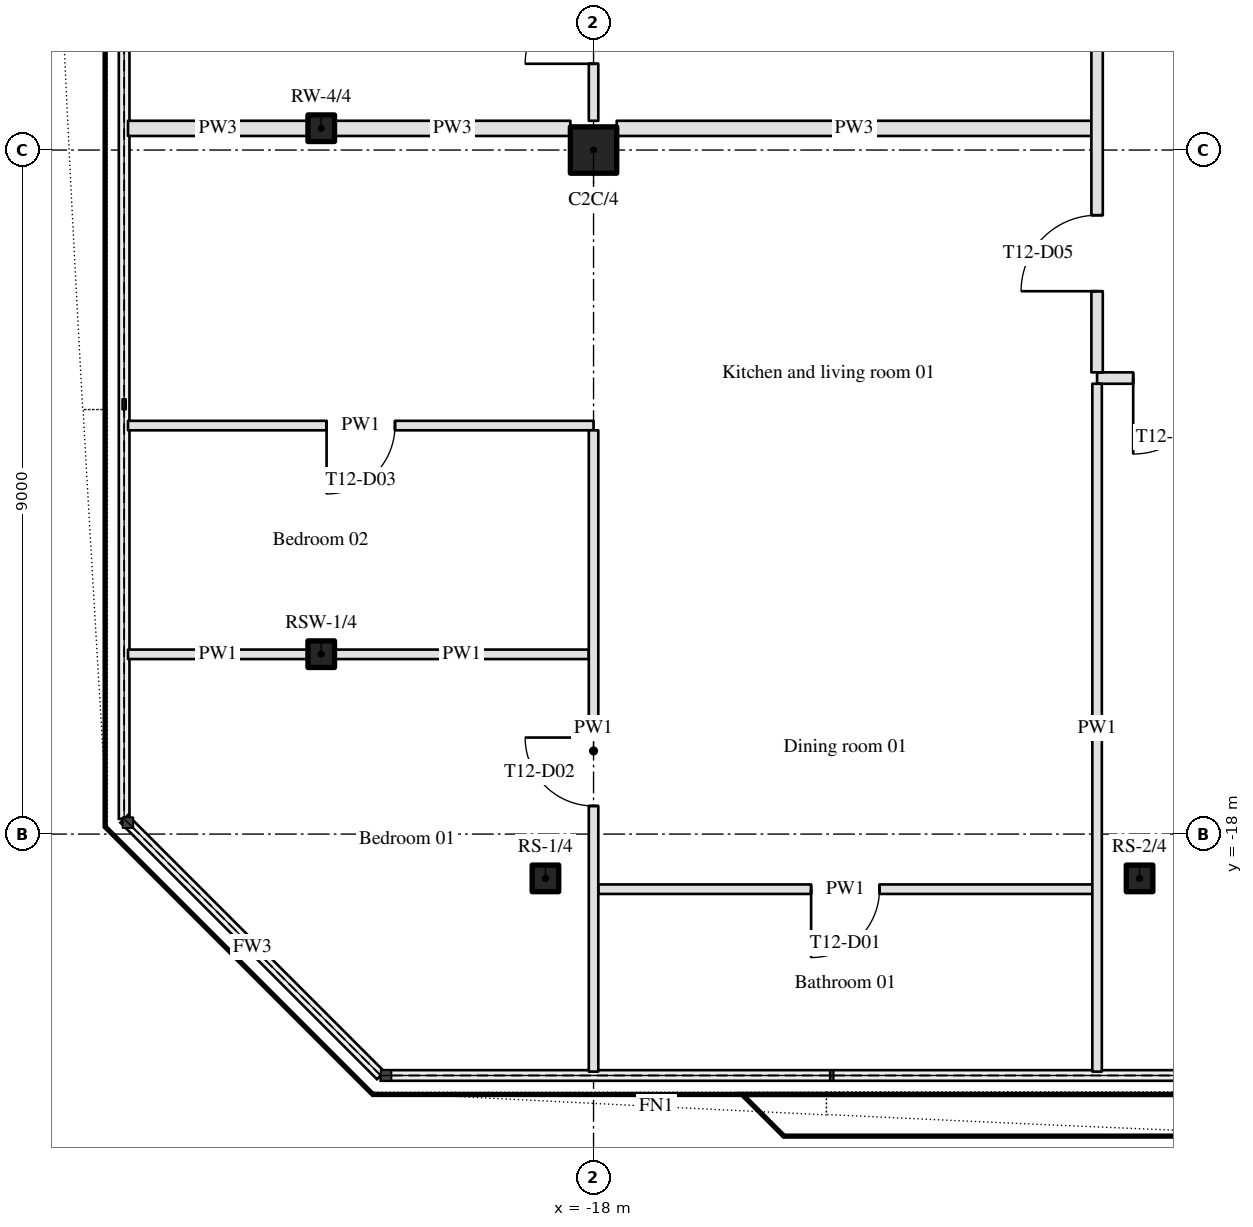
"""IFC4 building model, lengths in metres.
Left out: names, types, materials, properties, quantities, classifications, styles, units other than length and angle.
Written with IfcOpenShell. Run it as: python <this file> out.ifc"""

import sys

from ifc_helpers import new_model, si_unit, direction, frame, frame_2d, origin, origin_2d, place, context, subcontext, project, spatial, rectangle, hollow_rectangle, hollow_circle, extrude, element, fill, save


model = new_model("IFC4")
c1 = context("Model", 3, precision=1e-05, world=origin(), true_north=direction((0.0, 1.0)))
c2 = subcontext(c1, "Body", "Model", "MODEL_VIEW")
j1 = project(units=[si_unit("LENGTHUNIT", "METRE"), si_unit("PLANEANGLEUNIT", "RADIAN")], contexts=[c1])
p1 = place(None, origin())
s1 = spatial("IfcSite", under=j1, at=p1, CompositionType="ELEMENT")
p2 = place(p1, origin())
s2 = spatial("IfcBuilding", under=s1, at=p2, CompositionType="ELEMENT")
p3 = place(p2, frame((0.0, 0.0, 172.2)))
s3 = spatial("IfcBuildingStorey", under=s2, at=p3, CompositionType="ELEMENT", Elevation=172.2)
p4 = place(p3, frame((-18.0, -9.0, 0.0), z_axis=(0.0, 0.0, 1.0), x_axis=(1.0, 0.0, 0.0)))
e1 = element("IfcColumn", 1, at=p4, inside=s3, PredefinedType="COLUMN", context=c2, shape_type="SweptSolid", body=[
    extrude(hollow_circle(Radius=0.305, WallThickness=0.03, at=origin_2d()), origin(), (0.0, 0.0, 1.0), 3.15),
])
for number, where, z_axis, x_axis in (
    (2, (-18.633, -18.583, 0.0), (0.0, 0.0, 1.0), (1.0, 0.0, 0.0)),
    (3, (-10.816, -18.583, 0.0), (0.0, 0.0, 1.0), (1.0, 0.0, 0.0)),
    (4, (-21.583, -8.713, 0.0), (0.0, 0.0, 1.0), (1.0, 0.0, 0.0)),
    (5, (-21.583, -15.633, 0.0), (0.0, 0.0, 1.0), (1.0, 0.0, 0.0)),
):
    element("IfcColumn", number, at=place(p3, frame(where, z_axis=z_axis, x_axis=x_axis)), inside=s3, PredefinedType="COLUMN", context=c2, shape_type="SweptSolid", body=[
        extrude(hollow_rectangle(XDim=0.35, YDim=0.35, WallThickness=0.02, InnerFilletRadius=0.03, OuterFilletRadius=0.05, at=origin_2d()), origin(), (0.0, 0.0, 1.0), 3.15),
    ])
p5 = place(p3, frame((-11.438, -18.725, 0.0), z_axis=(0.0, 0.0, 1.0), x_axis=(-1.0, 0.0, 0.0)))
e6 = element("IfcWall", 6, at=p5, inside=s3, PredefinedType="PARTITIONING", context=c2, shape_type="SweptSolid", body=[
    extrude(rectangle(XDim=6.5, YDim=0.125, at=frame_2d((3.25, 0.0))), origin(), (0.0, 0.0, 1.0), 2.21),
])
p6 = place(p5, frame((2.8, 0.0, 0.0)))
e7 = element("IfcOpeningElement", 7, at=p6, cuts=e6, PredefinedType="OPENING", context=c2, shape_type="SweptSolid", body=[
    extrude(rectangle(XDim=0.9, YDim=2.1, at=frame_2d((0.45, 1.05))), frame((0.0, 0.073, 0.0), z_axis=(0.0, -1.0, 0.0), x_axis=(1.0, 0.0, 0.0)), (0.0, 0.0, 1.0), 0.145),
])
p7 = place(p3, frame((-24.125, -15.635, 0.0), z_axis=(0.0, 0.0, 1.0), x_axis=(1.0, 0.0, 0.0)))
e8 = element("IfcWall", 8, at=p7, inside=s3, PredefinedType="PARTITIONING", context=c2, shape_type="SweptSolid", body=[
    extrude(rectangle(XDim=2.367, YDim=0.125, at=frame_2d((1.184, 0.0))), origin(), (0.0, 0.0, 1.0), 2.21),
])
p8 = place(p3, frame((-21.408, -15.635, 0.0), z_axis=(0.0, 0.0, 1.0), x_axis=(1.0, 0.0, 0.0)))
e9 = element("IfcWall", 9, at=p8, inside=s3, PredefinedType="PARTITIONING", context=c2, shape_type="SweptSolid", body=[
    extrude(rectangle(XDim=3.345, YDim=0.125, at=frame_2d((1.673, 0.0))), origin(), (0.0, 0.0, 1.0), 2.21),
])
p9 = place(p3, frame((-18.0, -12.625, 0.0), z_axis=(0.0, 0.0, 1.0), x_axis=(-1.0, 0.0, 0.0)))
e10 = element("IfcWall", 10, at=p9, inside=s3, PredefinedType="PARTITIONING", context=c2, shape_type="SweptSolid", body=[
    extrude(rectangle(XDim=6.125, YDim=0.125, at=frame_2d((3.062, 0.0))), origin(), (0.0, 0.0, 1.0), 2.21),
])
p10 = place(p9, frame((2.613, 0.0, 0.0)))
e11 = element("IfcOpeningElement", 11, at=p10, cuts=e10, PredefinedType="OPENING", context=c2, shape_type="SweptSolid", body=[
    extrude(rectangle(XDim=0.9, YDim=2.1, at=frame_2d((0.45, 1.05))), frame((0.0, 0.073, 0.0), z_axis=(0.0, -1.0, 0.0), x_axis=(1.0, 0.0, 0.0)), (0.0, 0.0, 1.0), 0.145),
])
p11 = place(p3, frame((-9.5, -12.0, 0.0), z_axis=(0.0, 0.0, 1.0), x_axis=(-1.0, 0.0, 0.0)))
e12 = element("IfcWall", 12, at=p11, inside=s3, PredefinedType="PARTITIONING", context=c2, shape_type="SweptSolid", body=[
    extrude(rectangle(XDim=1.875, YDim=0.15, at=frame_2d((0.938, 0.0))), origin(), (0.0, 0.0, 1.0), 2.21),
])
p12 = place(p11, frame((0.4, 0.0, 0.0)))
e13 = element("IfcOpeningElement", 13, at=p12, cuts=e12, PredefinedType="OPENING", context=c2, shape_type="SweptSolid", body=[
    extrude(rectangle(XDim=1.0, YDim=2.1, at=frame_2d((0.5, 1.05))), frame((0.0, 0.085, 0.0), z_axis=(0.0, -1.0, 0.0), x_axis=(1.0, 0.0, 0.0)), (0.0, 0.0, 1.0), 0.17),
])
p13 = place(p3, frame((-24.125, -8.715, 0.0), z_axis=(0.0, 0.0, 1.0), x_axis=(1.0, 0.0, 0.0)))
e14 = element("IfcWall", 14, at=p13, inside=s3, PredefinedType="PARTITIONING", context=c2, shape_type="SweptSolid", body=[
    extrude(rectangle(XDim=2.367, YDim=0.2, at=frame_2d((1.184, 0.0))), origin(), (0.0, 0.0, 1.0), 2.21),
])
p14 = place(p3, frame((-21.408, -8.715, 0.0), z_axis=(0.0, 0.0, 1.0), x_axis=(1.0, 0.0, 0.0)))
e15 = element("IfcWall", 15, at=p14, inside=s3, PredefinedType="PARTITIONING", context=c2, shape_type="SweptSolid", body=[
    extrude(rectangle(XDim=3.103, YDim=0.2, at=frame_2d((1.552, 0.0))), origin(), (0.0, 0.0, 1.0), 2.21),
])
p15 = place(p3, frame((-17.695, -8.715, 0.0), z_axis=(0.0, 0.0, 1.0), x_axis=(1.0, 0.0, 0.0)))
e16 = element("IfcWall", 16, at=p15, inside=s3, PredefinedType="PARTITIONING", context=c2, shape_type="SweptSolid", body=[
    extrude(rectangle(XDim=6.245, YDim=0.2, at=frame_2d((3.123, 0.0))), origin(), (0.0, 0.0, 1.0), 2.21),
])
p16 = place(p3, frame((-18.0, -21.125, 0.0), z_axis=(0.0, 0.0, 1.0), x_axis=(0.0, 1.0, 0.0)))
e17 = element("IfcWall", 17, at=p16, inside=s3, PredefinedType="PARTITIONING", context=c2, shape_type="SweptSolid", body=[
    extrude(rectangle(XDim=8.438, YDim=0.125, at=frame_2d((4.219, 0.0))), origin(), (0.0, 0.0, 1.0), 2.21),
])
p17 = place(p16, frame((3.495, 0.0, 0.0)))
e18 = element("IfcOpeningElement", 18, at=p17, cuts=e17, PredefinedType="OPENING", context=c2, shape_type="SweptSolid", body=[
    extrude(rectangle(XDim=0.9, YDim=2.1, at=frame_2d((0.45, 1.05))), frame((0.0, 0.073, 0.0), z_axis=(0.0, -1.0, 0.0), x_axis=(1.0, 0.0, 0.0)), (0.0, 0.0, 1.0), 0.145),
])
p18 = place(p3, frame((-18.0, -8.615, 0.0), z_axis=(0.0, 0.0, 1.0), x_axis=(0.0, 1.0, 0.0)))
e19 = element("IfcWall", 19, at=p18, inside=s3, PredefinedType="PARTITIONING", context=c2, shape_type="SweptSolid", body=[
    extrude(rectangle(XDim=8.31, YDim=0.125, at=frame_2d((4.155, 0.0))), origin(), (0.0, 0.0, 1.0), 2.21),
])
p19 = place(p18, frame((5.11, 0.0, 0.0)))
e20 = element("IfcOpeningElement", 20, at=p19, cuts=e19, PredefinedType="OPENING", context=c2, shape_type="SweptSolid", body=[
    extrude(rectangle(XDim=0.9, YDim=2.1, at=frame_2d((0.45, 1.05))), frame((0.0, 0.073, 0.0), z_axis=(0.0, -1.0, 0.0), x_axis=(1.0, 0.0, 0.0)), (0.0, 0.0, 1.0), 0.145),
])
p20 = place(p18, frame((2.9, 0.0, 0.0)))
e21 = element("IfcOpeningElement", 21, at=p20, cuts=e19, PredefinedType="OPENING", context=c2, shape_type="SweptSolid", body=[
    extrude(rectangle(XDim=1.0, YDim=2.1, at=frame_2d((0.5, 1.05))), frame((0.0, 0.073, 0.0), z_axis=(0.0, -1.0, 0.0), x_axis=(1.0, 0.0, 0.0)), (0.0, 0.0, 1.0), 0.145),
])
p21 = place(p18, frame((0.75, 0.0, 0.0)))
e22 = element("IfcOpeningElement", 22, at=p21, cuts=e19, PredefinedType="OPENING", context=c2, shape_type="SweptSolid", body=[
    extrude(rectangle(XDim=0.9, YDim=2.1, at=frame_2d((0.45, 1.05))), frame((0.0, 0.073, 0.0), z_axis=(0.0, -1.0, 0.0), x_axis=(1.0, 0.0, 0.0)), (0.0, 0.0, 1.0), 0.145),
])
p22 = place(p3, frame((-11.375, -21.125, 0.0), z_axis=(0.0, 0.0, 1.0), x_axis=(0.0, 1.0, 0.0)))
e23 = element("IfcWall", 23, at=p22, inside=s3, PredefinedType="PARTITIONING", context=c2, shape_type="SweptSolid", body=[
    extrude(rectangle(XDim=9.05, YDim=0.125, at=frame_2d((4.525, 0.0))), origin(), (0.0, 0.0, 1.0), 2.21),
])
p23 = place(p3, frame((-11.375, -11.925, 0.0), z_axis=(0.0, 0.0, 1.0), x_axis=(0.0, 1.0, 0.0)))
e24 = element("IfcWall", 24, at=p23, inside=s3, PredefinedType="PARTITIONING", context=c2, shape_type="SweptSolid", body=[
    extrude(rectangle(XDim=23.25, YDim=0.15, at=frame_2d((11.625, 0.0))), origin(), (0.0, 0.0, 1.0), 2.21),
])
p24 = place(p23, frame((1.067, 0.0, 0.0)))
e25 = element("IfcOpeningElement", 25, at=p24, cuts=e24, PredefinedType="OPENING", context=c2, shape_type="SweptSolid", body=[
    extrude(rectangle(XDim=1.0, YDim=2.1, at=frame_2d((0.5, 1.05))), frame((0.0, 0.085, 0.0), z_axis=(0.0, -1.0, 0.0), x_axis=(1.0, 0.0, 0.0)), (0.0, 0.0, 1.0), 0.17),
])
p25 = place(p23, frame((19.01, 0.0, 0.0)))
e26 = element("IfcOpeningElement", 26, at=p25, cuts=e24, PredefinedType="OPENING", context=c2, shape_type="SweptSolid", body=[
    extrude(rectangle(XDim=1.0, YDim=2.1, at=frame_2d((0.5, 1.05))), frame((0.0, 0.085, 0.0), z_axis=(0.0, -1.0, 0.0), x_axis=(1.0, 0.0, 0.0)), (0.0, 0.0, 1.0), 0.17),
])
p26 = place(p24, origin())
e27 = element("IfcDoor", 27, at=p26, inside=s3, OperationType="SINGLE_SWING_LEFT", PredefinedType="DOOR", context=c2, shape_type="SweptSolid", body=[
    extrude(rectangle(XDim=1.0, YDim=2.1, at=frame_2d((0.5, 1.05))), frame((0.0, 0.025, 0.0), z_axis=(0.0, -1.0, 0.0), x_axis=(1.0, 0.0, 0.0)), (0.0, 0.0, 1.0), 0.05),
])
fill(e25, e27)
p27 = place(p6, origin())
e28 = element("IfcDoor", 28, at=p27, inside=s3, OperationType="SINGLE_SWING_RIGHT", PredefinedType="DOOR", context=c2, shape_type="SweptSolid", body=[
    extrude(rectangle(XDim=0.9, YDim=2.1, at=frame_2d((0.45, 1.05))), frame((0.0, 0.025, 0.0), z_axis=(0.0, -1.0, 0.0), x_axis=(1.0, 0.0, 0.0)), (0.0, 0.0, 1.0), 0.05),
])
fill(e7, e28)
p28 = place(p17, origin())
e29 = element("IfcDoor", 29, at=p28, inside=s3, OperationType="SINGLE_SWING_RIGHT", PredefinedType="DOOR", context=c2, shape_type="SweptSolid", body=[
    extrude(rectangle(XDim=0.9, YDim=2.1, at=frame_2d((0.45, 1.05))), frame((0.0, 0.025, 0.0), z_axis=(0.0, -1.0, 0.0), x_axis=(1.0, 0.0, 0.0)), (0.0, 0.0, 1.0), 0.05),
])
fill(e18, e29)
p29 = place(p10, origin())
e30 = element("IfcDoor", 30, at=p29, inside=s3, OperationType="SINGLE_SWING_RIGHT", PredefinedType="DOOR", context=c2, shape_type="SweptSolid", body=[
    extrude(rectangle(XDim=0.9, YDim=2.1, at=frame_2d((0.45, 1.05))), frame((0.0, 0.025, 0.0), z_axis=(0.0, -1.0, 0.0), x_axis=(1.0, 0.0, 0.0)), (0.0, 0.0, 1.0), 0.05),
])
fill(e11, e30)
p30 = place(p21, origin())
e31 = element("IfcDoor", 31, at=p30, inside=s3, OperationType="SINGLE_SWING_LEFT", PredefinedType="DOOR", context=c2, shape_type="SweptSolid", body=[
    extrude(rectangle(XDim=0.9, YDim=2.1, at=frame_2d((0.45, 1.05))), frame((0.0, 0.025, 0.0), z_axis=(0.0, -1.0, 0.0), x_axis=(1.0, 0.0, 0.0)), (0.0, 0.0, 1.0), 0.05),
])
fill(e22, e31)
p31 = place(p12, origin())
e32 = element("IfcDoor", 32, at=p31, inside=s3, OperationType="SINGLE_SWING_RIGHT", PredefinedType="DOOR", context=c2, shape_type="SweptSolid", body=[
    extrude(rectangle(XDim=1.0, YDim=2.1, at=frame_2d((0.5, 1.05))), frame((0.0, 0.025, 0.0), z_axis=(0.0, -1.0, 0.0), x_axis=(1.0, 0.0, 0.0)), (0.0, 0.0, 1.0), 0.05),
])
fill(e13, e32)
save(model, sys.argv[1])
